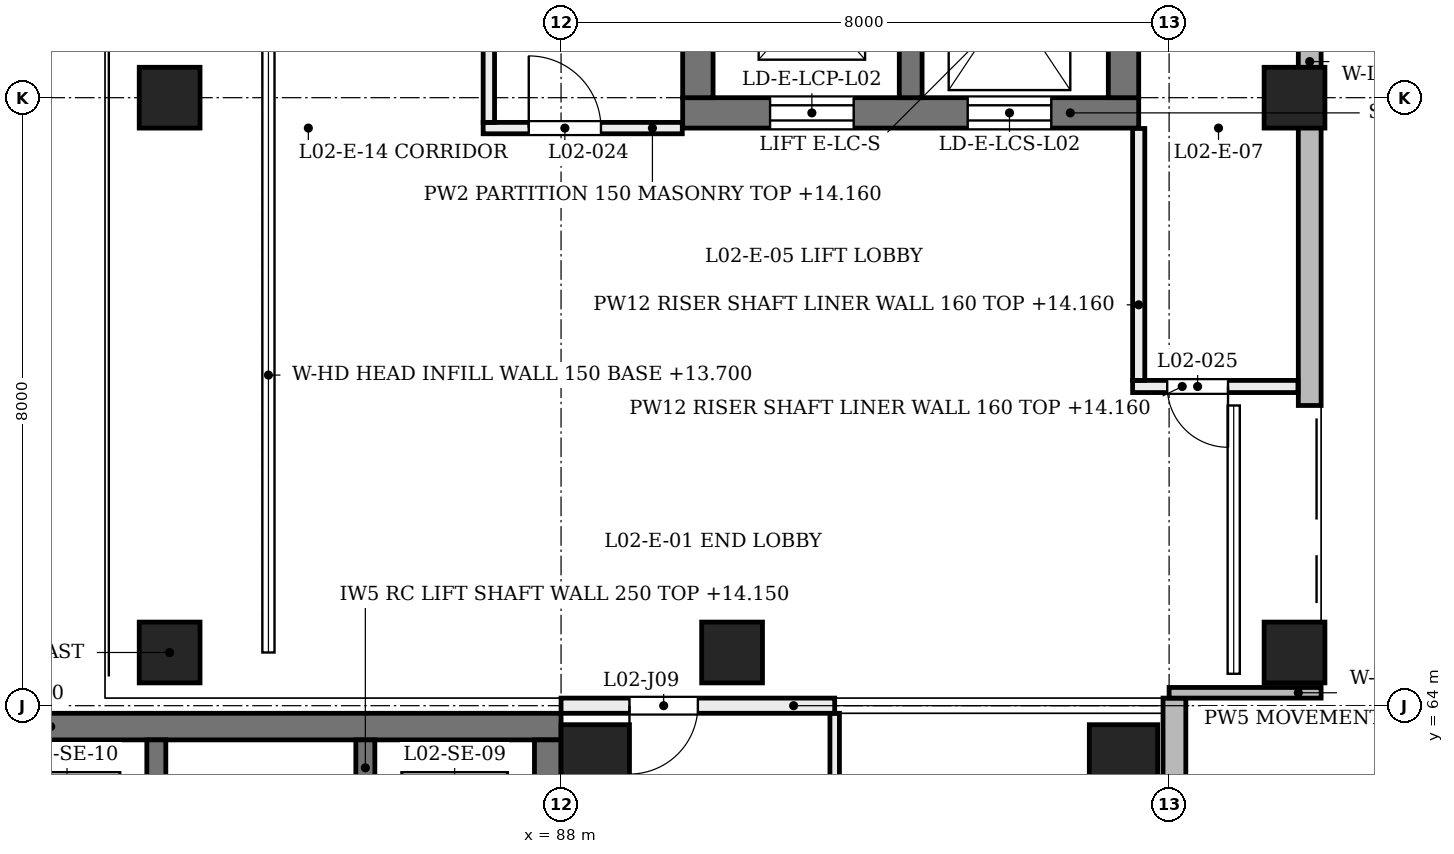
"""IFC4 building model, lengths in metres.
Left out: names, types, materials, properties, quantities, classifications, styles, units other than length and angle.
Written with IfcOpenShell. Run it as: python <this file> out.ifc"""

import sys

from ifc_helpers import new_model, si_unit, direction, frame, frame_2d, origin, origin_2d, place, context, subcontext, project, spatial, rectangle, extrude, element, fill, save


model = new_model("IFC4")
c1 = context("Model", 3, precision=1e-05, world=origin(), true_north=direction((0.0, 1.0)))
c2 = subcontext(c1, "Body", "Model", "MODEL_VIEW")
j1 = project(units=[si_unit("LENGTHUNIT", "METRE"), si_unit("PLANEANGLEUNIT", "RADIAN")], contexts=[c1])
p1 = place(None, origin())
s1 = spatial("IfcSite", under=j1, at=p1, CompositionType="ELEMENT")
p2 = place(p1, origin())
s2 = spatial("IfcBuilding", under=s1, at=p2, CompositionType="ELEMENT")
p3 = place(p2, frame((0.0, 0.0, 9.6)))
s3 = spatial("IfcBuildingStorey", under=s2, at=p3, CompositionType="ELEMENT", Elevation=9.6)
p4 = place(p3, frame((89.6, 71.8, 0.0), z_axis=(0.0, 0.0, 1.0), x_axis=(1.0, 0.0, 0.0)))
e1 = element("IfcWall", 1, at=p4, inside=s3, PredefinedType="SHEAR", context=c2, shape_type="SweptSolid", body=[
    extrude(rectangle(XDim=6.0, YDim=0.4, at=frame_2d((3.0, 0.0))), origin(), (0.0, 0.0, 1.0), 4.58),
])
p5 = place(p4, frame((1.15, 0.0, 0.0)))
e2 = element("IfcOpeningElement", 2, at=p5, cuts=e1, PredefinedType="OPENING", context=c2, shape_type="SweptSolid", body=[
    extrude(rectangle(XDim=1.1, YDim=2.1, at=frame_2d((0.55, 1.05))), frame((0.0, 0.21, 0.0), z_axis=(0.0, -1.0, 0.0), x_axis=(1.0, 0.0, 0.0)), (0.0, 0.0, 1.0), 0.42),
])
p6 = place(p4, frame((3.75, 0.0, 0.0)))
e3 = element("IfcOpeningElement", 3, at=p6, cuts=e1, PredefinedType="OPENING", context=c2, shape_type="SweptSolid", body=[
    extrude(rectangle(XDim=1.1, YDim=2.1, at=frame_2d((0.55, 1.05))), frame((0.0, 0.21, 0.0), z_axis=(0.0, -1.0, 0.0), x_axis=(1.0, 0.0, 0.0)), (0.0, 0.0, 1.0), 0.42),
])
for number, where, z_axis, x_axis in (
    (4, (89.8, 72.0, 0.0), (0.0, 0.0, 1.0), (0.0, 1.0, 0.0)),
    (5, (95.4, 72.0, 0.0), (0.0, 0.0, 1.0), (0.0, 1.0, 0.0)),
):
    element("IfcWall", number, at=place(p3, frame(where, z_axis=z_axis, x_axis=x_axis)), inside=s3, PredefinedType="SHEAR", context=c2, shape_type="SweptSolid", body=[
        extrude(rectangle(XDim=2.6, YDim=0.4, at=frame_2d((1.3, 0.0))), origin(), (0.0, 0.0, 1.0), 4.58),
    ])
p7 = place(p3, frame((92.6, 72.0, 0.0), z_axis=(0.0, 0.0, 1.0), x_axis=(0.0, 1.0, 0.0)))
e6 = element("IfcWall", 6, at=p7, inside=s3, PredefinedType="SHEAR", context=c2, shape_type="SweptSolid", body=[
    extrude(rectangle(XDim=2.6, YDim=0.3, at=frame_2d((1.3, 0.0))), origin(), (0.0, 0.0, 1.0), 4.58),
])
p8 = place(p3, frame((80.1, 63.725, 0.0), z_axis=(0.0, 0.0, 1.0), x_axis=(1.0, 0.0, 0.0)))
e7 = element("IfcWall", 7, at=p8, inside=s3, PredefinedType="SHEAR", context=c2, shape_type="SweptSolid", body=[
    extrude(rectangle(XDim=7.9, YDim=0.35, at=frame_2d((3.95, 0.0))), origin(), (0.0, 0.0, 1.0), 4.58),
])
p9 = place(p3, frame((87.825, 48.35, 0.0), z_axis=(0.0, 0.0, 1.0), x_axis=(0.0, 1.0, 0.0)))
e8 = element("IfcWall", 8, at=p9, inside=s3, PredefinedType="SHEAR", context=c2, shape_type="SweptSolid", body=[
    extrude(rectangle(XDim=15.2, YDim=0.35, at=frame_2d((7.6, 0.0))), origin(), (0.0, 0.0, 1.0), 4.58),
])
p10 = place(p9, frame((0.95, 0.0, 0.0)))
e9 = element("IfcOpeningElement", 9, at=p10, cuts=e8, PredefinedType="OPENING", context=c2, shape_type="SweptSolid", body=[
    extrude(rectangle(XDim=1.0, YDim=2.1, at=frame_2d((0.5, 1.05))), frame((0.0, 0.185, 0.0), z_axis=(0.0, -1.0, 0.0), x_axis=(1.0, 0.0, 0.0)), (0.0, 0.0, 1.0), 0.37),
])
p11 = place(p9, frame((10.6, 0.0, 0.0)))
e10 = element("IfcOpeningElement", 10, at=p11, cuts=e8, PredefinedType="OPENING", context=c2, shape_type="SweptSolid", body=[
    extrude(rectangle(XDim=1.4, YDim=2.1, at=frame_2d((0.7, 1.05))), frame((0.0, 0.185, 0.0), z_axis=(0.0, -1.0, 0.0), x_axis=(1.0, 0.0, 0.0)), (0.0, 0.0, 1.0), 0.37),
])
for number, where, z_axis, x_axis in (
    (11, (88.45, 63.3, 0.0), (0.0, 0.0, 1.0), (1.0, 0.0, 0.0)),
    (12, (95.4, 63.3, 0.0), (0.0, 0.0, 1.0), (1.0, 0.0, 0.0)),
):
    element("IfcColumn", number, at=place(p3, frame(where, z_axis=z_axis, x_axis=x_axis)), inside=s3, PredefinedType="COLUMN", context=c2, shape_type="SweptSolid", body=[
        extrude(rectangle(XDim=0.9, YDim=0.9, at=origin_2d()), origin(), (0.0, 0.0, 1.0), 4.8),
    ])
for number, where, z_axis, x_axis in (
    (13, (82.6, 64.7, 0.0), (0.204, 0.0, 0.979), (0.0, 1.0, 0.0)),
    (14, (82.6, 72.0, 0.0), (0.204, 0.0, 0.979), (0.0, 1.0, 0.0)),
    (15, (90.0, 64.7, 0.0), (0.204, 0.0, 0.979), (0.0, 1.0, 0.0)),
    (16, (97.4, 64.7, 0.0), (0.204, 0.0, 0.979), (0.0, 1.0, 0.0)),
    (17, (97.4, 72.0, 0.0), (0.204, 0.0, 0.979), (0.0, 1.0, 0.0)),
):
    element("IfcColumn", number, at=place(p3, frame(where, z_axis=z_axis, x_axis=x_axis)), inside=s3, PredefinedType="COLUMN", context=c2, shape_type="SweptSolid", body=[
        extrude(rectangle(XDim=0.8, YDim=0.8, at=origin_2d()), origin(), (0.0, 0.0, 1.0), 4.903),
    ])
p12 = place(p3, frame((97.85, 67.95, 0.0), z_axis=(0.0, 0.0, 1.0), x_axis=(0.0, 1.0, 0.0)))
e18 = element("IfcWall", 18, at=p12, inside=s3, PredefinedType="SOLIDWALL", context=c2, shape_type="SweptSolid", body=[
    extrude(rectangle(XDim=24.1, YDim=0.3, at=frame_2d((12.05, 0.0))), origin(), (0.0, 0.0, 1.0), 3.9),
])
p13 = place(p3, frame((84.15, 64.9, 4.1), z_axis=(0.0, 0.0, 1.0), x_axis=(0.0, 1.0, 0.0)))
e19 = element("IfcWall", 19, at=p13, inside=s3, PredefinedType="SOLIDWALL", context=c2, shape_type="SweptSolid", body=[
    extrude(rectangle(XDim=6.9, YDim=0.15, at=frame_2d((3.45, 0.0))), origin(), (0.0, 0.0, 1.0), 0.48),
])
p14 = place(p3, frame((84.15, 72.2, 4.1), z_axis=(0.0, 0.0, 1.0), x_axis=(0.0, 1.0, 0.0)))
e20 = element("IfcWall", 20, at=p14, inside=s3, PredefinedType="SOLIDWALL", context=c2, shape_type="SweptSolid", body=[
    extrude(rectangle(XDim=7.6, YDim=0.15, at=frame_2d((3.8, 0.0))), origin(), (0.0, 0.0, 1.0), 0.48),
])
p15 = place(p3, frame((96.07, 47.7, 0.0), z_axis=(0.0, 0.0, 1.0), x_axis=(0.0, 1.0, 0.0)))
e21 = element("IfcWall", 21, at=p15, inside=s3, PredefinedType="SOLIDWALL", context=c2, shape_type="SweptSolid", body=[
    extrude(rectangle(XDim=16.4, YDim=0.3, at=frame_2d((8.2, 0.0))), origin(), (0.0, 0.0, 1.0), 3.9),
])
p16 = place(p15, frame((0.9, 0.0, 0.75)))
e22 = element("IfcOpeningElement", 22, at=p16, cuts=e21, PredefinedType="OPENING", context=c2, shape_type="SweptSolid", body=[
    extrude(rectangle(XDim=0.9, YDim=3.1, at=frame_2d((0.45, 1.55))), frame((0.0, 0.16, 0.0), z_axis=(0.0, -1.0, 0.0), x_axis=(1.0, 0.0, 0.0)), (0.0, 0.0, 1.0), 0.32),
])
p17 = place(p15, frame((3.6, 0.0, 0.75)))
e23 = element("IfcOpeningElement", 23, at=p17, cuts=e21, PredefinedType="OPENING", context=c2, shape_type="SweptSolid", body=[
    extrude(rectangle(XDim=0.9, YDim=3.1, at=frame_2d((0.45, 1.55))), frame((0.0, 0.16, 0.0), z_axis=(0.0, -1.0, 0.0), x_axis=(1.0, 0.0, 0.0)), (0.0, 0.0, 1.0), 0.32),
])
p18 = place(p15, frame((6.3, 0.0, 0.75)))
e24 = element("IfcOpeningElement", 24, at=p18, cuts=e21, PredefinedType="OPENING", context=c2, shape_type="SweptSolid", body=[
    extrude(rectangle(XDim=0.9, YDim=3.1, at=frame_2d((0.45, 1.55))), frame((0.0, 0.16, 0.0), z_axis=(0.0, -1.0, 0.0), x_axis=(1.0, 0.0, 0.0)), (0.0, 0.0, 1.0), 0.32),
])
p19 = place(p15, frame((9.0, 0.0, 0.75)))
e25 = element("IfcOpeningElement", 25, at=p19, cuts=e21, PredefinedType="OPENING", context=c2, shape_type="SweptSolid", body=[
    extrude(rectangle(XDim=0.9, YDim=3.1, at=frame_2d((0.45, 1.55))), frame((0.0, 0.16, 0.0), z_axis=(0.0, -1.0, 0.0), x_axis=(1.0, 0.0, 0.0)), (0.0, 0.0, 1.0), 0.32),
])
p20 = place(p15, frame((11.7, 0.0, 0.75)))
e26 = element("IfcOpeningElement", 26, at=p20, cuts=e21, PredefinedType="OPENING", context=c2, shape_type="SweptSolid", body=[
    extrude(rectangle(XDim=0.9, YDim=3.1, at=frame_2d((0.45, 1.55))), frame((0.0, 0.16, 0.0), z_axis=(0.0, -1.0, 0.0), x_axis=(1.0, 0.0, 0.0)), (0.0, 0.0, 1.0), 0.32),
])
p21 = place(p15, frame((14.4, 0.0, 0.75)))
e27 = element("IfcOpeningElement", 27, at=p21, cuts=e21, PredefinedType="OPENING", context=c2, shape_type="SweptSolid", body=[
    extrude(rectangle(XDim=0.9, YDim=3.1, at=frame_2d((0.45, 1.55))), frame((0.0, 0.16, 0.0), z_axis=(0.0, -1.0, 0.0), x_axis=(1.0, 0.0, 0.0)), (0.0, 0.0, 1.0), 0.32),
])
p22 = place(p3, frame((96.0, 64.17, 0.0), z_axis=(0.0, 0.0, 1.0), x_axis=(1.0, 0.0, 0.0)))
e28 = element("IfcWall", 28, at=p22, inside=s3, PredefinedType="SOLIDWALL", context=c2, shape_type="SweptSolid", body=[
    extrude(rectangle(XDim=2.0, YDim=0.14, at=frame_2d((1.0, 0.0))), origin(), (0.0, 0.0, 1.0), 3.9),
])
for number, where, z_axis, x_axis in (
    (29, (85.425, 61.1, 0.0), (0.0, 0.0, 1.0), (0.0, 1.0, 0.0)),
    (30, (82.675, 61.1, 0.0), (0.0, 0.0, 1.0), (0.0, 1.0, 0.0)),
):
    element("IfcWall", number, at=place(p3, frame(where, z_axis=z_axis, x_axis=x_axis)), inside=s3, PredefinedType="SOLIDWALL", context=c2, shape_type="SweptSolid", body=[
        extrude(rectangle(XDim=2.45, YDim=0.25, at=frame_2d((1.225, 0.0))), origin(), (0.0, 0.0, 1.0), 4.55),
    ])
p23 = place(p3, frame((95.52, 68.2, 0.0), z_axis=(0.0, 0.0, 1.0), x_axis=(1.0, 0.0, 0.0)))
e31 = element("IfcWall", 31, at=p23, inside=s3, PredefinedType="PARTITIONING", context=c2, shape_type="SweptSolid", body=[
    extrude(rectangle(XDim=2.175, YDim=0.16, at=frame_2d((1.087, 0.0))), origin(), (0.0, 0.0, 1.0), 4.56),
])
p24 = place(p23, frame((0.455, 0.0, 0.0)))
e32 = element("IfcOpeningElement", 32, at=p24, cuts=e31, PredefinedType="OPENING", context=c2, shape_type="SweptSolid", body=[
    extrude(rectangle(XDim=0.8, YDim=2.1, at=frame_2d((0.4, 1.05))), frame((0.0, 0.09, 0.0), z_axis=(0.0, -1.0, 0.0), x_axis=(1.0, 0.0, 0.0)), (0.0, 0.0, 1.0), 0.18),
])
p25 = place(p3, frame((86.975, 71.6, 0.0), z_axis=(0.0, 0.0, 1.0), x_axis=(1.0, 0.0, 0.0)))
e33 = element("IfcWall", 33, at=p25, inside=s3, PredefinedType="PARTITIONING", context=c2, shape_type="SweptSolid", body=[
    extrude(rectangle(XDim=2.62, YDim=0.15, at=frame_2d((1.31, 0.0))), origin(), (0.0, 0.0, 1.0), 4.56),
])
p26 = place(p25, frame((0.6, 0.0, 0.0)))
e34 = element("IfcOpeningElement", 34, at=p26, cuts=e33, PredefinedType="OPENING", context=c2, shape_type="SweptSolid", body=[
    extrude(rectangle(XDim=0.95, YDim=2.1, at=frame_2d((0.475, 1.05))), frame((0.0, 0.085, 0.0), z_axis=(0.0, -1.0, 0.0), x_axis=(1.0, 0.0, 0.0)), (0.0, 0.0, 1.0), 0.17),
])
p27 = place(p3, frame((95.6, 68.28, 0.0), z_axis=(0.0, 0.0, 1.0), x_axis=(0.0, 1.0, 0.0)))
e35 = element("IfcWall", 35, at=p27, inside=s3, PredefinedType="PARTITIONING", context=c2, shape_type="SweptSolid", body=[
    extrude(rectangle(XDim=3.315, YDim=0.16, at=frame_2d((1.657, 0.0))), origin(), (0.0, 0.0, 1.0), 4.56),
])
p28 = place(p3, frame((87.05, 71.675, 0.0), z_axis=(0.0, 0.0, 1.0), x_axis=(0.0, 1.0, 0.0)))
e36 = element("IfcWall", 36, at=p28, inside=s3, PredefinedType="PARTITIONING", context=c2, shape_type="SweptSolid", body=[
    extrude(rectangle(XDim=3.725, YDim=0.15, at=frame_2d((1.862, 0.0))), origin(), (0.0, 0.0, 1.0), 3.98),
])
p29 = place(p3, frame((91.6, 53.467, 0.0), z_axis=(0.0, 0.0, 1.0), x_axis=(0.0, 1.0, 0.0)))
e37 = element("IfcWall", 37, at=p29, inside=s3, PredefinedType="PARTITIONING", context=c2, shape_type="SweptSolid", body=[
    extrude(rectangle(XDim=10.433, YDim=0.125, at=frame_2d((5.217, 0.0))), origin(), (0.0, 0.0, 1.0), 3.88),
])
p30 = place(p29, frame((1.701, 0.0, 0.0)))
e38 = element("IfcOpeningElement", 38, at=p30, cuts=e37, PredefinedType="OPENING", context=c2, shape_type="SweptSolid", body=[
    extrude(rectangle(XDim=1.0, YDim=2.1, at=frame_2d((0.5, 1.05))), frame((0.0, 0.073, 0.0), z_axis=(0.0, -1.0, 0.0), x_axis=(1.0, 0.0, 0.0)), (0.0, 0.0, 1.0), 0.145),
])
p31 = place(p29, frame((6.949, 0.0, 0.0)))
e39 = element("IfcOpeningElement", 39, at=p31, cuts=e37, PredefinedType="OPENING", context=c2, shape_type="SweptSolid", body=[
    extrude(rectangle(XDim=1.0, YDim=2.1, at=frame_2d((0.5, 1.05))), frame((0.0, 0.073, 0.0), z_axis=(0.0, -1.0, 0.0), x_axis=(1.0, 0.0, 0.0)), (0.0, 0.0, 1.0), 0.145),
])
p32 = place(p3, frame((88.0, 64.0, 0.0), z_axis=(0.0, 0.0, 1.0), x_axis=(1.0, 0.0, 0.0)))
e40 = element("IfcWall", 40, at=p32, inside=s3, PredefinedType="PARTITIONING", context=c2, shape_type="SweptSolid", body=[
    extrude(rectangle(XDim=3.6, YDim=0.2, at=frame_2d((1.8, 0.0))), origin(), (0.0, 0.0, 1.0), 3.88),
])
p33 = place(p32, frame((0.9, 0.0, 0.0)))
e41 = element("IfcOpeningElement", 41, at=p33, cuts=e40, PredefinedType="OPENING", context=c2, shape_type="SweptSolid", body=[
    extrude(rectangle(XDim=0.9, YDim=2.1, at=frame_2d((0.45, 1.05))), frame((0.0, 0.11, 0.0), z_axis=(0.0, -1.0, 0.0), x_axis=(1.0, 0.0, 0.0)), (0.0, 0.0, 1.0), 0.22),
])
p34 = place(p5, frame((1.1, 0.0, 0.0), z_axis=(0.0, 0.0, 1.0), x_axis=(-1.0, 0.0, 0.0)))
e42 = element("IfcDoor", 42, at=p34, inside=s3, OperationType="DOUBLE_DOOR_SLIDING", PredefinedType="DOOR", context=c2, shape_type="SweptSolid", body=[
    extrude(rectangle(XDim=1.1, YDim=2.1, at=frame_2d((0.55, 1.05))), frame((0.0, 0.025, 0.0), z_axis=(0.0, -1.0, 0.0), x_axis=(1.0, 0.0, 0.0)), (0.0, 0.0, 1.0), 0.05),
])
fill(e2, e42)
p35 = place(p6, frame((1.1, 0.0, 0.0), z_axis=(0.0, 0.0, 1.0), x_axis=(-1.0, 0.0, 0.0)))
e43 = element("IfcDoor", 43, at=p35, inside=s3, OperationType="DOUBLE_DOOR_SLIDING", PredefinedType="DOOR", context=c2, shape_type="SweptSolid", body=[
    extrude(rectangle(XDim=1.1, YDim=2.1, at=frame_2d((0.55, 1.05))), frame((0.0, 0.025, 0.0), z_axis=(0.0, -1.0, 0.0), x_axis=(1.0, 0.0, 0.0)), (0.0, 0.0, 1.0), 0.05),
])
fill(e3, e43)
p36 = place(p26, origin())
e44 = element("IfcDoor", 44, at=p36, inside=s3, OperationType="SINGLE_SWING_LEFT", PredefinedType="DOOR", context=c2, shape_type="SweptSolid", body=[
    extrude(rectangle(XDim=0.95, YDim=2.1, at=frame_2d((0.475, 1.05))), frame((0.0, 0.025, 0.0), z_axis=(0.0, -1.0, 0.0), x_axis=(1.0, 0.0, 0.0)), (0.0, 0.0, 1.0), 0.05),
])
fill(e34, e44)
p37 = place(p24, origin())
e45 = element("IfcDoor", 45, at=p37, inside=s3, OperationType="SINGLE_SWING_RIGHT", PredefinedType="DOOR", context=c2, shape_type="SweptSolid", body=[
    extrude(rectangle(XDim=0.8, YDim=2.1, at=frame_2d((0.4, 1.05))), frame((0.0, 0.025, 0.0), z_axis=(0.0, -1.0, 0.0), x_axis=(1.0, 0.0, 0.0)), (0.0, 0.0, 1.0), 0.05),
])
fill(e32, e45)
p38 = place(p33, frame((0.9, 0.0, 0.0), z_axis=(0.0, 0.0, 1.0), x_axis=(-1.0, 0.0, 0.0)))
e46 = element("IfcDoor", 46, at=p38, inside=s3, OperationType="SINGLE_SWING_LEFT", PredefinedType="DOOR", context=c2, shape_type="SweptSolid", body=[
    extrude(rectangle(XDim=0.9, YDim=2.1, at=frame_2d((0.45, 1.05))), frame((0.0, 0.025, 0.0), z_axis=(0.0, -1.0, 0.0), x_axis=(1.0, 0.0, 0.0)), (0.0, 0.0, 1.0), 0.05),
])
fill(e41, e46)
save(model, sys.argv[1])
